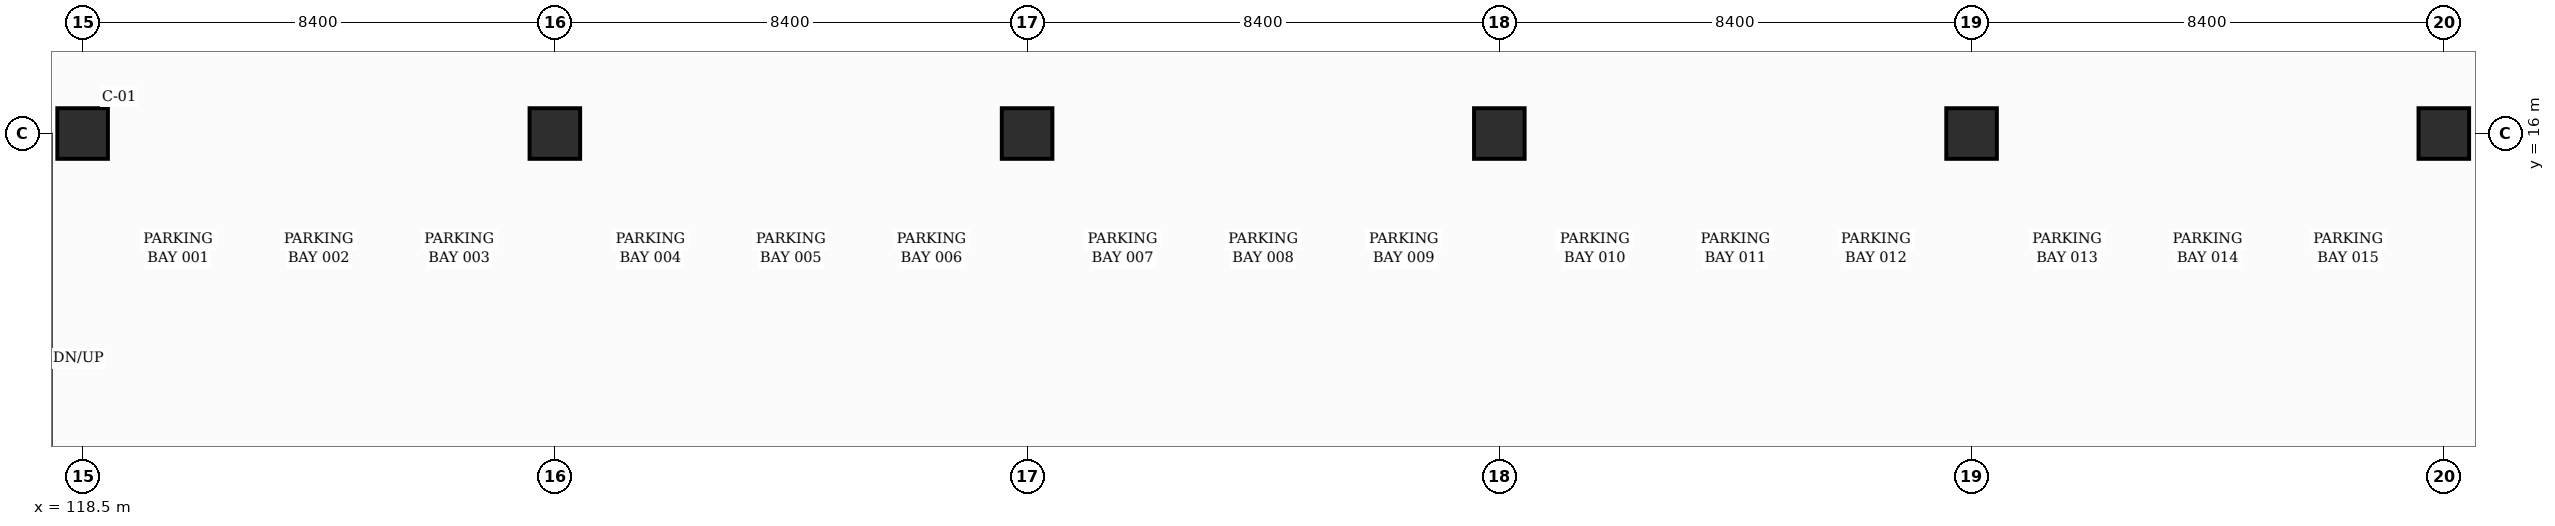
"""IFC4 building model, lengths in metres.
Left out: names, types, materials, properties, quantities, classifications, styles, units other than length and angle.
Written with IfcOpenShell. Run it as: python <this file> out.ifc"""

import sys

from ifc_helpers import new_model, si_unit, direction, frame, origin, origin_2d, place, context, subcontext, project, spatial, hollow_rectangle, extrude, element, save


model = new_model("IFC4")
c1 = context("Model", 3, precision=1e-05, world=origin(), true_north=direction((0.0, 1.0)))
c2 = subcontext(c1, "Body", "Model", "MODEL_VIEW")
j1 = project(units=[si_unit("LENGTHUNIT", "METRE"), si_unit("PLANEANGLEUNIT", "RADIAN")], contexts=[c1])
p1 = place(None, origin())
s1 = spatial("IfcSite", under=j1, at=p1, CompositionType="ELEMENT")
p2 = place(p1, origin())
s2 = spatial("IfcBuilding", under=s1, at=p2, CompositionType="ELEMENT")
p3 = place(p2, frame((0.0, 0.0, -5.4)))
s3 = spatial("IfcBuildingStorey", under=s2, at=p3, CompositionType="ELEMENT", Elevation=-5.4)
for number, where, z_axis, x_axis in (
    (1, (118.5, 16.0, 0.0), (0.0, 0.0, 1.0), (1.0, 0.0, 0.0)),
    (2, (126.9, 16.0, 0.0), (0.0, 0.0, 1.0), (1.0, 0.0, 0.0)),
    (3, (135.3, 16.0, 0.0), (0.0, 0.0, 1.0), (1.0, 0.0, 0.0)),
    (4, (143.7, 16.0, 0.0), (0.0, 0.0, 1.0), (1.0, 0.0, 0.0)),
    (5, (152.1, 16.0, 0.0), (0.0, 0.0, 1.0), (1.0, 0.0, 0.0)),
    (6, (160.5, 16.0, 0.0), (0.0, 0.0, 1.0), (1.0, 0.0, 0.0)),
):
    element("IfcColumn", number, at=place(p3, frame(where, z_axis=z_axis, x_axis=x_axis)), inside=s3, PredefinedType="COLUMN", context=c2, shape_type="SweptSolid", body=[
        extrude(hollow_rectangle(XDim=0.9, YDim=0.9, WallThickness=0.032, InnerFilletRadius=0.032, OuterFilletRadius=0.064, at=origin_2d()), origin(), (0.0, 0.0, 1.0), 5.4),
    ])
save(model, sys.argv[1])
